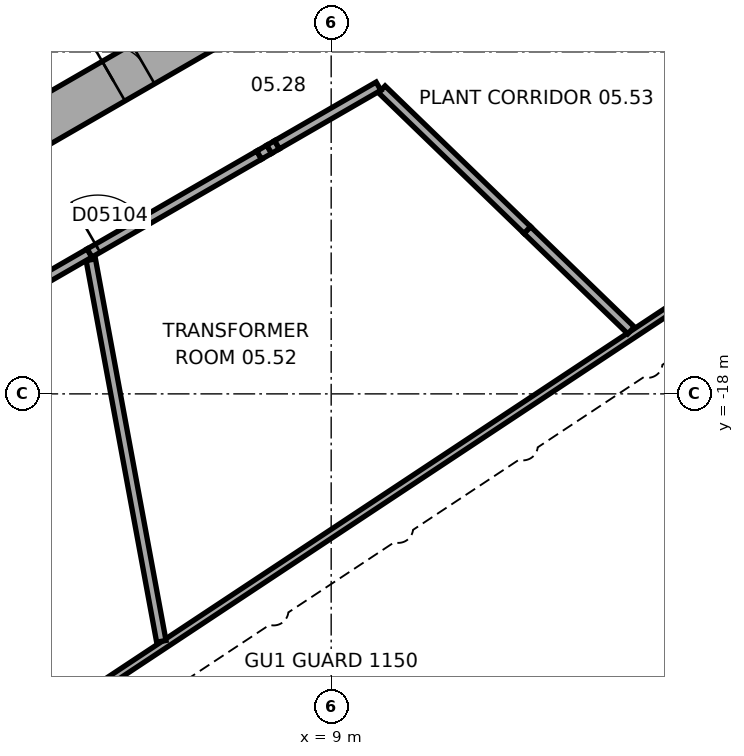
"""IFC4 building model, lengths in metres.
Left out: names, types, materials, properties, quantities, classifications, styles, units other than length and angle.
Written with IfcOpenShell. Run it as: python <this file> out.ifc"""

import sys

from ifc_helpers import new_model, si_unit, direction, frame, frame_2d, origin, place, context, subcontext, project, spatial, rectangle, extrude, element, fill, save


model = new_model("IFC4")
c1 = context("Model", 3, precision=1e-05, world=origin(), true_north=direction((0.0, 1.0)))
c2 = subcontext(c1, "Body", "Model", "MODEL_VIEW")
j1 = project(units=[si_unit("LENGTHUNIT", "METRE"), si_unit("PLANEANGLEUNIT", "RADIAN")], contexts=[c1])
p1 = place(None, origin())
s1 = spatial("IfcSite", under=j1, at=p1, CompositionType="ELEMENT")
p2 = place(p1, origin())
s2 = spatial("IfcBuilding", under=s1, at=p2, CompositionType="ELEMENT")
p3 = place(p2, frame((0.0, 0.0, 34.5)))
s3 = spatial("IfcBuildingStorey", under=s2, at=p3, CompositionType="ELEMENT", Elevation=34.5)
p4 = place(p3, frame((-0.3, -11.836, 0.0), z_axis=(0.0, 0.0, 1.0), x_axis=(0.866021384402, 0.500006961711, 0.0)))
e1 = element("IfcWall", 1, at=p4, inside=s3, PredefinedType="SHEAR", context=c2, shape_type="SweptSolid", body=[
    extrude(rectangle(XDim=12.355, YDim=1.2, at=frame_2d((6.178, 0.0))), origin(), (0.0, 0.0, 1.0), 4.5),
])
p5 = place(p4, frame((4.128, 0.0, 0.0)))
e2 = element("IfcOpeningElement", 2, at=p5, cuts=e1, PredefinedType="OPENING", context=c2, shape_type="SweptSolid", body=[
    extrude(rectangle(XDim=0.9, YDim=2.1, at=frame_2d((0.45, 1.05))), frame((0.0, 0.61, 0.0), z_axis=(0.0, -1.0, 0.0), x_axis=(1.0, 0.0, 0.0)), (0.0, 0.0, 1.0), 1.22),
])
p6 = place(p4, frame((7.928, 0.0, 0.0)))
e3 = element("IfcOpeningElement", 3, at=p6, cuts=e1, PredefinedType="OPENING", context=c2, shape_type="SweptSolid", body=[
    extrude(rectangle(XDim=1.1, YDim=2.1, at=frame_2d((0.55, 1.05))), frame((0.0, 0.61, 0.0), z_axis=(0.0, -1.0, 0.0), x_axis=(1.0, 0.0, 0.0)), (0.0, 0.0, 1.0), 1.22),
])
p7 = place(p3, frame((3.083, -25.601, 0.0), z_axis=(0.0, 0.0, 1.0), x_axis=(0.833884295743, 0.551939291329, 0.0)))
e4 = element("IfcWall", 4, at=p7, inside=s3, PredefinedType="STANDARD", context=c2, shape_type="SweptSolid", body=[
    extrude(rectangle(XDim=21.246, YDim=0.2, at=frame_2d((10.623, 0.0))), origin(), (0.0, 0.0, 1.0), 4.5),
])
p8 = place(p3, frame((2.675, -14.471, 0.0), z_axis=(0.0, 0.0, 1.0), x_axis=(0.181757015391, -0.983343473745, 0.0)))
e5 = element("IfcWall", 5, at=p8, inside=s3, PredefinedType="SOLIDWALL", context=c2, shape_type="SweptSolid", body=[
    extrude(rectangle(XDim=10.21, YDim=0.25, at=frame_2d((5.105, 0.0))), origin(), (0.0, 0.0, 1.0), 4.2),
])
p9 = place(p3, frame((2.642, -14.294, 0.0), z_axis=(0.0, 0.0, 1.0), x_axis=(-0.866029891721, -0.499992226585, 0.0)))
e6 = element("IfcWall", 6, at=p9, inside=s3, PredefinedType="SOLIDWALL", context=c2, shape_type="SweptSolid", body=[
    extrude(rectangle(XDim=2.951, YDim=0.25, at=frame_2d((1.475, 0.0))), origin(), (0.0, 0.0, 1.0), 4.2),
])
p10 = place(p3, frame((2.642, -14.294, 0.0), z_axis=(0.0, 0.0, 1.0), x_axis=(0.866004128649, 0.500036847806, 0.0)))
e7 = element("IfcWall", 7, at=p10, inside=s3, PredefinedType="SOLIDWALL", context=c2, shape_type="SweptSolid", body=[
    extrude(rectangle(XDim=5.153, YDim=0.25, at=frame_2d((2.577, 0.0))), origin(), (0.0, 0.0, 1.0), 4.2),
])
p11 = place(p10, frame((0.25, 0.0, 0.0)))
e8 = element("IfcOpeningElement", 8, at=p11, cuts=e7, PredefinedType="OPENING", context=c2, shape_type="SweptSolid", body=[
    extrude(rectangle(XDim=1.4, YDim=2.1, at=frame_2d((0.7, 1.05))), frame((0.0, 0.135, 0.0), z_axis=(0.0, -1.0, 0.0), x_axis=(1.0, 0.0, 0.0)), (0.0, 0.0, 1.0), 0.27),
])
p12 = place(p3, frame((14.16, -13.688, 0.0), z_axis=(0.0, 0.0, 1.0), x_axis=(0.718925227395, -0.695087417103, 0.0)))
e9 = element("IfcWall", 9, at=p12, inside=s3, PredefinedType="SOLIDWALL", context=c2, shape_type="SweptSolid", body=[
    extrude(rectangle(XDim=3.8, YDim=0.25, at=frame_2d((1.9, 0.0))), origin(), (0.0, 0.0, 1.0), 3.4),
])
p13 = place(p3, frame((7.105, -11.717, 0.0), z_axis=(0.0, 0.0, 1.0), x_axis=(0.866119007285, 0.499837838923, 0.0)))
e10 = element("IfcWall", 10, at=p13, inside=s3, PredefinedType="SOLIDWALL", context=c2, shape_type="SweptSolid", body=[
    extrude(rectangle(XDim=0.305, YDim=0.25, at=frame_2d((0.153, 0.0))), origin(), (0.0, 0.0, 1.0), 4.2),
])
p14 = place(p3, frame((7.575, -11.446, 0.0), z_axis=(0.0, 0.0, 1.0), x_axis=(-0.86608282171, -0.499900536046, 0.0)))
e11 = element("IfcWall", 11, at=p14, inside=s3, PredefinedType="SOLIDWALL", context=c2, shape_type="SweptSolid", body=[
    extrude(rectangle(XDim=0.237, YDim=0.25, at=frame_2d((0.119, 0.0))), origin(), (0.0, 0.0, 1.0), 4.2),
])
p15 = place(p3, frame((10.332, -9.987, 0.0), z_axis=(0.0, 0.0, 1.0), x_axis=(0.718927275113, -0.695085299153, 0.0)))
e12 = element("IfcWall", 12, at=p15, inside=s3, PredefinedType="SOLIDWALL", context=c2, shape_type="SweptSolid", body=[
    extrude(rectangle(XDim=5.325, YDim=0.25, at=frame_2d((2.662, 0.0))), origin(), (0.0, 0.0, 1.0), 3.4),
])
p16 = place(p3, frame((10.246, -9.904, 0.0), z_axis=(0.0, 0.0, 1.0), x_axis=(-0.866047158059, -0.499962318598, 0.0)))
e13 = element("IfcWall", 13, at=p16, inside=s3, PredefinedType="SOLIDWALL", context=c2, shape_type="SweptSolid", body=[
    extrude(rectangle(XDim=3.084, YDim=0.25, at=frame_2d((1.542, 0.0))), origin(), (0.0, 0.0, 1.0), 4.2),
])
p17 = place(p5, origin())
e14 = element("IfcDoor", 14, at=p17, inside=s3, OperationType="SINGLE_SWING_LEFT", PredefinedType="DOOR", context=c2, shape_type="SweptSolid", body=[
    extrude(rectangle(XDim=0.9, YDim=2.1, at=frame_2d((0.45, 1.05))), frame((0.0, 0.025, 0.0), z_axis=(0.0, -1.0, 0.0), x_axis=(1.0, 0.0, 0.0)), (0.0, 0.0, 1.0), 0.05),
])
fill(e2, e14)
p18 = place(p11, origin())
e15 = element("IfcDoor", 15, at=p18, inside=s3, OperationType="SINGLE_SWING_LEFT", PredefinedType="DOOR", context=c2, shape_type="SweptSolid", body=[
    extrude(rectangle(XDim=1.4, YDim=2.1, at=frame_2d((0.7, 1.05))), frame((0.0, 0.025, 0.0), z_axis=(0.0, -1.0, 0.0), x_axis=(1.0, 0.0, 0.0)), (0.0, 0.0, 1.0), 0.05),
])
fill(e8, e15)
save(model, sys.argv[1])
